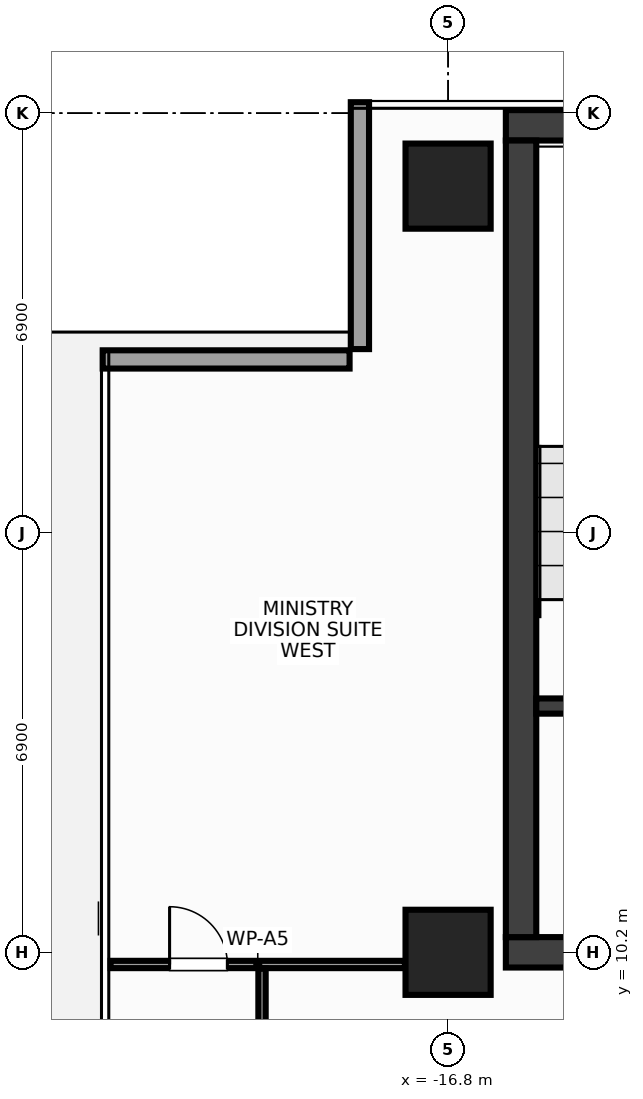
"""IFC4 building model, lengths in metres.
Left out: names, types, materials, properties, quantities, classifications, styles, units other than length and angle.
Written with IfcOpenShell. Run it as: python <this file> out.ifc"""

import sys

from ifc_helpers import new_model, si_unit, direction, frame, frame_2d, origin, origin_2d, place, context, subcontext, project, spatial, rectangle, extrude, source, transform, mapped, element, fill, save


model = new_model("IFC4")
c1 = context("Model", 3, precision=1e-05, world=origin(), true_north=direction((0.0, 1.0)))
c2 = subcontext(c1, "Body", "Model", "MODEL_VIEW")
j1 = project(units=[si_unit("LENGTHUNIT", "METRE"), si_unit("PLANEANGLEUNIT", "RADIAN")], contexts=[c1])
p1 = place(None, origin())
s1 = spatial("IfcSite", under=j1, at=p1, CompositionType="ELEMENT")
p2 = place(p1, origin())
s2 = spatial("IfcBuilding", under=s1, at=p2, CompositionType="ELEMENT")
p3 = place(p2, frame((0.0, 0.0, 228.8)))
s3 = spatial("IfcBuildingStorey", under=s2, at=p3, CompositionType="ELEMENT", Elevation=228.8)
m1 = source(origin(), c2, "Body", "SweptSolid", [
    extrude(rectangle(XDim=31.7, YDim=0.5, at=frame_2d((15.85, 0.0))), origin(), (0.0, 0.0, 1.0), 3.6),
])
p4 = place(p3, frame((-15.85, 23.8, 0.0), z_axis=(0.0, 0.0, 1.0), x_axis=(1.0, 0.0, 0.0)))
e1 = element("IfcWall", 1, at=p4, inside=s3, PredefinedType="SHEAR", context=c2, shape_type="MappedRepresentation", body=[
    mapped(m1, transform((0.0, 0.0, 0.0), x_axis=(1.0, 0.0, 0.0), y_axis=(0.0, 1.0, 0.0), z_axis=(0.0, 0.0, 1.0), scale=1.0)),
])
p5 = place(p3, frame((-15.85, 10.2, 0.0), z_axis=(0.0, 0.0, 1.0), x_axis=(1.0, 0.0, 0.0)))
e2 = element("IfcWall", 2, at=p5, inside=s3, PredefinedType="SHEAR", context=c2, shape_type="MappedRepresentation", body=[
    mapped(m1, transform((0.0, 0.0, 0.0), x_axis=(1.0, 0.0, 0.0), y_axis=(0.0, 1.0, 0.0), z_axis=(0.0, 0.0, 1.0), scale=1.0)),
])
p6 = place(p5, frame((1.7, 0.0, 0.0)))
e3 = element("IfcOpeningElement", 3, at=p6, cuts=e2, PredefinedType="OPENING", context=c2, shape_type="SweptSolid", body=[
    extrude(rectangle(XDim=1.6, YDim=2.15, at=frame_2d((0.8, 1.075))), frame((0.0, 0.262, 0.0), z_axis=(0.0, -1.0, 0.0), x_axis=(1.0, 0.0, 0.0)), (0.0, 0.0, 1.0), 0.524),
])
p7 = place(p5, frame((28.4, 0.0, 0.0)))
e4 = element("IfcOpeningElement", 4, at=p7, cuts=e2, PredefinedType="OPENING", context=c2, shape_type="SweptSolid", body=[
    extrude(rectangle(XDim=1.6, YDim=2.15, at=frame_2d((0.8, 1.075))), frame((0.0, 0.262, 0.0), z_axis=(0.0, -1.0, 0.0), x_axis=(1.0, 0.0, 0.0)), (0.0, 0.0, 1.0), 0.524),
])
p8 = place(p5, frame((15.1, 0.0, 0.0)))
e5 = element("IfcOpeningElement", 5, at=p8, cuts=e2, PredefinedType="OPENING", context=c2, shape_type="SweptSolid", body=[
    extrude(rectangle(XDim=1.5, YDim=2.2, at=frame_2d((0.75, 1.1))), frame((0.0, 0.262, 0.0), z_axis=(0.0, -1.0, 0.0), x_axis=(1.0, 0.0, 0.0)), (0.0, 0.0, 1.0), 0.524),
])
m2 = source(origin(), c2, "Body", "SweptSolid", [
    extrude(rectangle(XDim=13.1, YDim=0.5, at=frame_2d((6.55, 0.0))), origin(), (0.0, 0.0, 1.0), 3.6),
])
p9 = place(p3, frame((-15.6, 10.45, 0.0), z_axis=(0.0, 0.0, 1.0), x_axis=(0.0, 1.0, 0.0)))
e6 = element("IfcWall", 6, at=p9, inside=s3, PredefinedType="SHEAR", context=c2, shape_type="MappedRepresentation", body=[
    mapped(m2, transform((0.0, 0.0, 0.0), x_axis=(1.0, 0.0, 0.0), y_axis=(0.0, 1.0, 0.0), z_axis=(0.0, 0.0, 1.0), scale=1.0)),
])
m3 = source(origin(), c2, "Body", "SweptSolid", [
    extrude(rectangle(XDim=3.705, YDim=0.25, at=frame_2d((1.853, 0.0))), origin(), (0.0, 0.0, 1.0), 3.6),
])
p10 = place(p3, frame((-15.35, 14.25, 0.0), z_axis=(0.0, 0.0, 1.0), x_axis=(1.0, 0.0, 0.0)))
e7 = element("IfcWall", 7, at=p10, inside=s3, PredefinedType="SHEAR", context=c2, shape_type="MappedRepresentation", body=[
    mapped(m3, transform((0.0, 0.0, 0.0), x_axis=(1.0, 0.0, 0.0), y_axis=(0.0, 1.0, 0.0), z_axis=(0.0, 0.0, 1.0), scale=1.0)),
])
p11 = place(p10, frame((0.95, 0.0, 0.0)))
e8 = element("IfcOpeningElement", 8, at=p11, cuts=e7, PredefinedType="OPENING", context=c2, shape_type="SweptSolid", body=[
    extrude(rectangle(XDim=1.6, YDim=2.15, at=frame_2d((0.8, 1.075))), frame((0.0, 0.137, 0.0), z_axis=(0.0, -1.0, 0.0), x_axis=(1.0, 0.0, 0.0)), (0.0, 0.0, 1.0), 0.274),
])
m4 = source(origin(), c2, "Body", "SweptSolid", [
    extrude(rectangle(XDim=1.4, YDim=1.4, at=origin_2d()), origin(), (0.0, 0.0, 1.0), 3.6),
])
for number, where, z_axis, x_axis in (
    (9, (-16.8, 10.2, 0.0), (0.0, 0.0, 1.0), (1.0, 0.0, 0.0)),
    (10, (-16.8, 22.8, 0.0), (0.0, 0.0, 1.0), (1.0, 0.0, 0.0)),
):
    element("IfcColumn", number, at=place(p3, frame(where, z_axis=z_axis, x_axis=x_axis)), inside=s3, PredefinedType="COLUMN", context=c2, shape_type="MappedRepresentation", body=[
        mapped(m4, transform((0.0, 0.0, 0.0), x_axis=(1.0, 0.0, 0.0), y_axis=(0.0, 1.0, 0.0), z_axis=(0.0, 0.0, 1.0), scale=1.0)),
    ])
m5 = source(origin(), c2, "Body", "SweptSolid", [
    extrude(rectangle(XDim=4.06, YDim=0.3, at=frame_2d((2.03, 0.0))), origin(), (0.0, 0.0, 1.0), 2.75),
])
p12 = place(p3, frame((-18.25, 24.18, 0.0), z_axis=(0.0, 0.0, 1.0), x_axis=(0.0, -1.0, 0.0)))
e11 = element("IfcWall", 11, at=p12, inside=s3, PredefinedType="STANDARD", context=c2, shape_type="MappedRepresentation", body=[
    mapped(m5, transform((0.0, 0.0, 0.0), x_axis=(1.0, 0.0, 0.0), y_axis=(0.0, 1.0, 0.0), z_axis=(0.0, 0.0, 1.0), scale=1.0)),
])
m6 = source(origin(), c2, "Body", "SweptSolid", [
    extrude(rectangle(XDim=4.06, YDim=0.3, at=frame_2d((2.03, 0.0))), origin(), (0.0, 0.0, 1.0), 2.75),
])
p13 = place(p3, frame((-18.42, 19.95, 0.0), z_axis=(0.0, 0.0, 1.0), x_axis=(-1.0, 0.0, 0.0)))
e12 = element("IfcWall", 12, at=p13, inside=s3, PredefinedType="STANDARD", context=c2, shape_type="MappedRepresentation", body=[
    mapped(m6, transform((0.0, 0.0, 0.0), x_axis=(1.0, 0.0, 0.0), y_axis=(0.0, 1.0, 0.0), z_axis=(0.0, 0.0, 1.0), scale=1.0)),
])
m7 = source(origin(), c2, "Body", "SweptSolid", [
    extrude(rectangle(XDim=4.84, YDim=0.12, at=frame_2d((2.42, 0.0))), origin(), (0.0, 0.0, 1.0), 3.37),
])
p14 = place(p3, frame((-22.35, 10.0, 0.0), z_axis=(0.0, 0.0, 1.0), x_axis=(1.0, 0.0, 0.0)))
e13 = element("IfcWall", 13, at=p14, inside=s3, PredefinedType="PARTITIONING", context=c2, shape_type="MappedRepresentation", body=[
    mapped(m7, transform((0.0, 0.0, 0.0), x_axis=(1.0, 0.0, 0.0), y_axis=(0.0, 1.0, 0.0), z_axis=(0.0, 0.0, 1.0), scale=1.0)),
])
p15 = place(p14, frame((0.97, 0.0, 0.0)))
e14 = element("IfcOpeningElement", 14, at=p15, cuts=e13, PredefinedType="OPENING", context=c2, shape_type="SweptSolid", body=[
    extrude(rectangle(XDim=0.95, YDim=2.15, at=frame_2d((0.475, 1.075))), frame((0.0, 0.072, 0.0), z_axis=(0.0, -1.0, 0.0), x_axis=(1.0, 0.0, 0.0)), (0.0, 0.0, 1.0), 0.144),
])
m8 = source(origin(), c2, "Body", "SweptSolid", [
    extrude(rectangle(XDim=2.13, YDim=0.12, at=frame_2d((1.065, 0.0))), origin(), (0.0, 0.0, 1.0), 3.37),
])
p16 = place(p3, frame((-19.86, 7.805, 0.0), z_axis=(0.0, 0.0, 1.0), x_axis=(0.0, 1.0, 0.0)))
e15 = element("IfcWall", 15, at=p16, inside=s3, PredefinedType="PARTITIONING", context=c2, shape_type="MappedRepresentation", body=[
    mapped(m8, transform((0.0, 0.0, 0.0), x_axis=(1.0, 0.0, 0.0), y_axis=(0.0, 1.0, 0.0), z_axis=(0.0, 0.0, 1.0), scale=1.0)),
])
m9 = source(origin(), c2, "Body", "SweptSolid", [
    extrude(rectangle(XDim=0.95, YDim=2.15, at=frame_2d((0.475, 1.075))), frame((0.0, 0.025, 0.0), z_axis=(0.0, -1.0, 0.0), x_axis=(1.0, 0.0, 0.0)), (0.0, 0.0, 1.0), 0.05),
])
p17 = place(p15, origin())
e16 = element("IfcDoor", 16, at=p17, inside=s3, OperationType="SINGLE_SWING_LEFT", PredefinedType="DOOR", context=c2, shape_type="MappedRepresentation", body=[
    mapped(m9, transform((0.0, 0.0, 0.0), x_axis=(1.0, 0.0, 0.0), y_axis=(0.0, 1.0, 0.0), z_axis=(0.0, 0.0, 1.0), scale=1.0)),
])
fill(e14, e16)
save(model, sys.argv[1])
